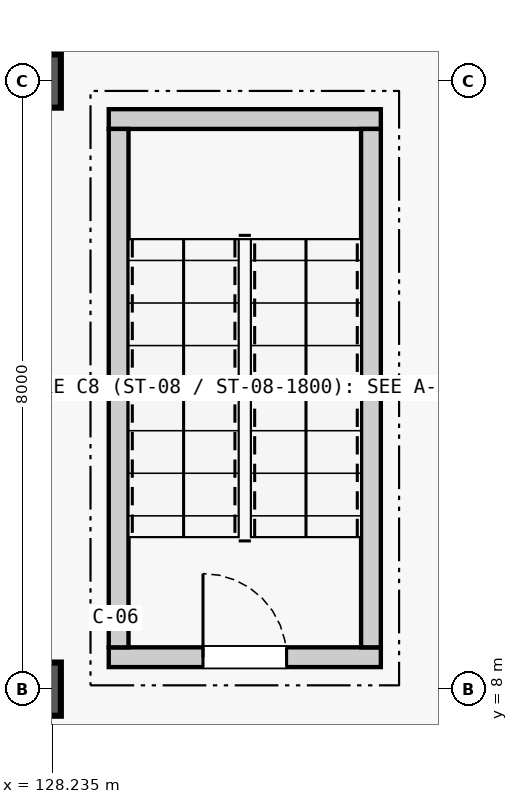
"""IFC4 building model, lengths in metres.
Left out: names, types, materials, properties, quantities, classifications, styles, units other than length and angle.
Written with IfcOpenShell. Run it as: python <this file> out.ifc"""

import sys

from ifc_helpers import new_model, si_unit, direction, frame, frame_2d, origin, origin_2d, place, context, subcontext, project, spatial, rectangle, extrude, element, fill, save


model = new_model("IFC4")
c1 = context("Model", 3, precision=1e-05, world=origin(), true_north=direction((0.0, 1.0)))
c2 = subcontext(c1, "Body", "Model", "MODEL_VIEW")
j1 = project(units=[si_unit("LENGTHUNIT", "METRE"), si_unit("PLANEANGLEUNIT", "RADIAN")], contexts=[c1])
p1 = place(None, origin())
s1 = spatial("IfcSite", under=j1, at=p1, CompositionType="ELEMENT")
p2 = place(p1, origin())
s2 = spatial("IfcBuilding", under=s1, at=p2, CompositionType="ELEMENT")
p3 = place(p2, frame((0.0, 0.0, -5.4)))
s3 = spatial("IfcBuildingStorey", under=s2, at=p3, CompositionType="ELEMENT", Elevation=-5.4)
for number, where, z_axis, x_axis in (
    (1, (128.0, 8.0, 0.0), (0.0, 0.0, 1.0), (1.0, 0.0, 0.0)),
    (2, (128.0, 16.0, 0.0), (0.0, 0.0, 1.0), (1.0, 0.0, 0.0)),
):
    element("IfcColumn", number, at=place(p3, frame(where, z_axis=z_axis, x_axis=x_axis)), inside=s3, PredefinedType="COLUMN", context=c2, shape_type="SweptSolid", body=[
        extrude(rectangle(XDim=0.7, YDim=0.7, at=origin_2d()), origin(), (0.0, 0.0, 1.0), 5.4),
    ])
p4 = place(p3, frame((128.98, 8.42, 0.0), z_axis=(0.0, 0.0, 1.0), x_axis=(1.0, 0.0, 0.0)))
e3 = element("IfcWall", 3, at=p4, inside=s3, PredefinedType="SOLIDWALL", context=c2, shape_type="SweptSolid", body=[
    extrude(rectangle(XDim=3.58, YDim=0.26, at=frame_2d((1.79, 0.0))), origin(), (0.0, 0.0, 1.0), 5.4),
])
p5 = place(p4, frame((1.24, 0.0, 0.0)))
e4 = element("IfcOpeningElement", 4, at=p5, cuts=e3, PredefinedType="OPENING", context=c2, shape_type="SweptSolid", body=[
    extrude(rectangle(XDim=1.1, YDim=2.2, at=frame_2d((0.55, 1.1))), frame((0.0, 0.142, 0.0), z_axis=(0.0, -1.0, 0.0), x_axis=(1.0, 0.0, 0.0)), (0.0, 0.0, 1.0), 0.284),
])
p6 = place(p3, frame((128.98, 15.5, 0.0), z_axis=(0.0, 0.0, 1.0), x_axis=(1.0, 0.0, 0.0)))
e5 = element("IfcWall", 5, at=p6, inside=s3, PredefinedType="SOLIDWALL", context=c2, shape_type="SweptSolid", body=[
    extrude(rectangle(XDim=3.58, YDim=0.26, at=frame_2d((1.79, 0.0))), origin(), (0.0, 0.0, 1.0), 5.4),
])
for number, where, z_axis, x_axis in (
    (6, (129.11, 8.55, 0.0), (0.0, 0.0, 1.0), (0.0, 1.0, 0.0)),
    (7, (132.43, 8.55, 0.0), (0.0, 0.0, 1.0), (0.0, 1.0, 0.0)),
):
    element("IfcWall", number, at=place(p3, frame(where, z_axis=z_axis, x_axis=x_axis)), inside=s3, PredefinedType="SOLIDWALL", context=c2, shape_type="SweptSolid", body=[
        extrude(rectangle(XDim=6.82, YDim=0.26, at=frame_2d((3.41, 0.0))), origin(), (0.0, 0.0, 1.0), 5.4),
    ])
p7 = place(p5, origin())
e8 = element("IfcDoor", 8, at=p7, inside=s3, OperationType="SINGLE_SWING_LEFT", PredefinedType="DOOR", context=c2, shape_type="SweptSolid", body=[
    extrude(rectangle(XDim=1.1, YDim=2.2, at=frame_2d((0.55, 1.1))), frame((0.0, 0.025, 0.0), z_axis=(0.0, -1.0, 0.0), x_axis=(1.0, 0.0, 0.0)), (0.0, 0.0, 1.0), 0.05),
])
fill(e4, e8)
save(model, sys.argv[1])
